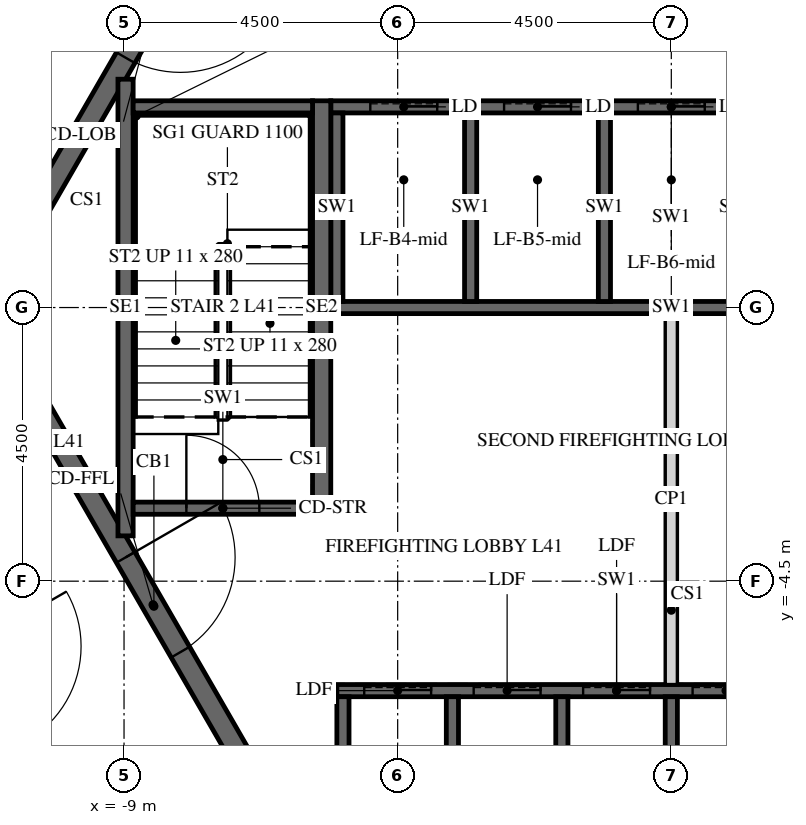
"""IFC4 building model, lengths in metres.
Left out: names, types, materials, properties, quantities, classifications, styles, units other than length and angle.
Written with IfcOpenShell. Run it as: python <this file> out.ifc"""

import sys

from ifc_helpers import new_model, si_unit, direction, frame, frame_2d, origin, place, context, subcontext, project, spatial, polyline, rectangle, outline, extrude, element, fill, save


model = new_model("IFC4")
c1 = context("Model", 3, precision=1e-05, world=origin(), true_north=direction((0.0, 1.0)))
c2 = subcontext(c1, "Body", "Model", "MODEL_VIEW")
j1 = project(units=[si_unit("LENGTHUNIT", "METRE"), si_unit("PLANEANGLEUNIT", "RADIAN")], contexts=[c1])
p1 = place(None, origin())
s1 = spatial("IfcSite", under=j1, at=p1, CompositionType="ELEMENT")
p2 = place(p1, origin())
s2 = spatial("IfcBuilding", under=s1, at=p2, CompositionType="ELEMENT")
p3 = place(p2, frame((0.0, 0.0, 176.1)))
s3 = spatial("IfcBuildingStorey", under=s2, at=p3, CompositionType="ELEMENT", Elevation=176.1)
p4 = place(p3, frame((-7.361, 12.75, -0.15), z_axis=(0.0, 0.0, 1.0), x_axis=(-0.50000571537, -0.866022103989, 0.0)))
e1 = element("IfcWall", 1, at=p4, inside=s3, PredefinedType="SHEAR", context=c2, shape_type="SweptSolid", body=[
    extrude(outline(polyline([(-0.144, -0.25), (14.867, -0.25), (14.578, 0.25), (0.144, 0.25), (-0.144, -0.25)])), origin(), (0.0, 0.0, 1.0), 3.9),
])
p5 = place(p4, frame((6.49, 0.0, 0.15)))
e2 = element("IfcOpeningElement", 2, at=p5, cuts=e1, PredefinedType="OPENING", context=c2, shape_type="SweptSolid", body=[
    extrude(rectangle(XDim=1.8, YDim=2.4, at=frame_2d((0.9, 1.2))), frame((0.0, 0.26, 0.0), z_axis=(0.0, -1.0, 0.0), x_axis=(1.0, 0.0, 0.0)), (0.0, 0.0, 1.0), 0.52),
])
p6 = place(p3, frame((-14.722, 0.0, -0.15), z_axis=(0.0, 0.0, 1.0), x_axis=(0.50000571537, -0.866022103989, 0.0)))
e3 = element("IfcWall", 3, at=p6, inside=s3, PredefinedType="SHEAR", context=c2, shape_type="SweptSolid", body=[
    extrude(outline(polyline([(-0.144, -0.25), (14.867, -0.25), (14.578, 0.25), (0.144, 0.25), (-0.144, -0.25)])), origin(), (0.0, 0.0, 1.0), 3.9),
])
p7 = place(p6, frame((6.432, 0.0, 0.15)))
e4 = element("IfcOpeningElement", 4, at=p7, cuts=e3, PredefinedType="OPENING", context=c2, shape_type="SweptSolid", body=[
    extrude(rectangle(XDim=1.8, YDim=2.4, at=frame_2d((0.9, 1.2))), frame((0.0, 0.26, 0.0), z_axis=(0.0, -1.0, 0.0), x_axis=(1.0, 0.0, 0.0)), (0.0, 0.0, 1.0), 0.52),
])
p8 = place(p3, frame((-5.673, 9.825, -0.15), z_axis=(0.0, 0.0, 1.0), x_axis=(-0.499995046907, -0.866028263435, 0.0)))
e5 = element("IfcWall", 5, at=p8, inside=s3, PredefinedType="SHEAR", context=c2, shape_type="SweptSolid", body=[
    extrude(outline(polyline([(-0.101, -0.175), (11.446, -0.175), (11.244, 0.175), (0.101, 0.175), (-0.101, -0.175)])), origin(), (0.0, 0.0, 1.0), 3.9),
])
p9 = place(p8, frame((4.801, 0.0, 0.15)))
e6 = element("IfcOpeningElement", 6, at=p9, cuts=e5, PredefinedType="OPENING", context=c2, shape_type="SweptSolid", body=[
    extrude(rectangle(XDim=1.8, YDim=2.4, at=frame_2d((0.9, 1.2))), frame((0.0, 0.185, 0.0), z_axis=(0.0, -1.0, 0.0), x_axis=(1.0, 0.0, 0.0)), (0.0, 0.0, 1.0), 0.37),
])
p10 = place(p3, frame((-11.345, 0.0, -0.15), z_axis=(0.0, 0.0, 1.0), x_axis=(0.499995046907, -0.866028263435, 0.0)))
e7 = element("IfcWall", 7, at=p10, inside=s3, PredefinedType="SHEAR", context=c2, shape_type="SweptSolid", body=[
    extrude(outline(polyline([(-0.101, -0.175), (11.446, -0.175), (11.244, 0.175), (0.101, 0.175), (-0.101, -0.175)])), origin(), (0.0, 0.0, 1.0), 3.9),
])
p11 = place(p10, frame((4.744, 0.0, 0.15)))
e8 = element("IfcOpeningElement", 8, at=p11, cuts=e7, PredefinedType="OPENING", context=c2, shape_type="SweptSolid", body=[
    extrude(rectangle(XDim=1.8, YDim=2.4, at=frame_2d((0.9, 1.2))), frame((0.0, 0.185, 0.0), z_axis=(0.0, -1.0, 0.0), x_axis=(1.0, 0.0, 0.0)), (0.0, 0.0, 1.0), 0.37),
])
p12 = place(p3, frame((-5.6, 3.3, -0.25), z_axis=(0.0, 0.0, 1.0), x_axis=(1.0, 0.0, 0.0)))
e9 = element("IfcWall", 9, at=p12, inside=s3, PredefinedType="SHEAR", context=c2, shape_type="SweptSolid", body=[
    extrude(rectangle(XDim=11.2, YDim=0.2, at=frame_2d((5.6, 0.0))), origin(), (0.0, 0.0, 1.0), 3.9),
])
p13 = place(p12, frame((0.65, 0.0, 0.25)))
e10 = element("IfcOpeningElement", 10, at=p13, cuts=e9, PredefinedType="OPENING", context=c2, shape_type="SweptSolid", body=[
    extrude(rectangle(XDim=1.1, YDim=2.1, at=frame_2d((0.55, 1.05))), frame((0.0, 0.11, 0.0), z_axis=(0.0, -1.0, 0.0), x_axis=(1.0, 0.0, 0.0)), (0.0, 0.0, 1.0), 0.22),
])
p14 = place(p12, frame((2.85, 0.0, 0.25)))
e11 = element("IfcOpeningElement", 11, at=p14, cuts=e9, PredefinedType="OPENING", context=c2, shape_type="SweptSolid", body=[
    extrude(rectangle(XDim=1.1, YDim=2.1, at=frame_2d((0.55, 1.05))), frame((0.0, 0.11, 0.0), z_axis=(0.0, -1.0, 0.0), x_axis=(1.0, 0.0, 0.0)), (0.0, 0.0, 1.0), 0.22),
])
p15 = place(p12, frame((5.05, 0.0, 0.25)))
e12 = element("IfcOpeningElement", 12, at=p15, cuts=e9, PredefinedType="OPENING", context=c2, shape_type="SweptSolid", body=[
    extrude(rectangle(XDim=1.1, YDim=2.1, at=frame_2d((0.55, 1.05))), frame((0.0, 0.11, 0.0), z_axis=(0.0, -1.0, 0.0), x_axis=(1.0, 0.0, 0.0)), (0.0, 0.0, 1.0), 0.22),
])
p16 = place(p12, frame((7.25, 0.0, 0.25)))
e13 = element("IfcOpeningElement", 13, at=p16, cuts=e9, PredefinedType="OPENING", context=c2, shape_type="SweptSolid", body=[
    extrude(rectangle(XDim=1.1, YDim=2.1, at=frame_2d((0.55, 1.05))), frame((0.0, 0.11, 0.0), z_axis=(0.0, -1.0, 0.0), x_axis=(1.0, 0.0, 0.0)), (0.0, 0.0, 1.0), 0.22),
])
p17 = place(p12, frame((9.45, 0.0, 0.25)))
e14 = element("IfcOpeningElement", 14, at=p17, cuts=e9, PredefinedType="OPENING", context=c2, shape_type="SweptSolid", body=[
    extrude(rectangle(XDim=1.1, YDim=2.1, at=frame_2d((0.55, 1.05))), frame((0.0, 0.11, 0.0), z_axis=(0.0, -1.0, 0.0), x_axis=(1.0, 0.0, 0.0)), (0.0, 0.0, 1.0), 0.22),
])
p18 = place(p3, frame((-5.6, 0.0, -0.25), z_axis=(0.0, 0.0, 1.0), x_axis=(1.0, 0.0, 0.0)))
e15 = element("IfcWall", 15, at=p18, inside=s3, PredefinedType="SHEAR", context=c2, shape_type="SweptSolid", body=[
    extrude(rectangle(XDim=11.2, YDim=0.2, at=frame_2d((5.6, 0.0))), origin(), (0.0, 0.0, 1.0), 3.9),
])
for number, where, z_axis, x_axis in (
    (16, (-5.5, 0.1, -0.25), (0.0, 0.0, 1.0), (0.0, 1.0, 0.0)),
    (17, (-3.3, 0.1, -0.25), (0.0, 0.0, 1.0), (0.0, 1.0, 0.0)),
    (18, (-1.1, 0.1, -0.25), (0.0, 0.0, 1.0), (0.0, 1.0, 0.0)),
):
    element("IfcWall", number, at=place(p3, frame(where, z_axis=z_axis, x_axis=x_axis)), inside=s3, PredefinedType="SHEAR", context=c2, shape_type="SweptSolid", body=[
        extrude(rectangle(XDim=3.1, YDim=0.2, at=frame_2d((1.55, 0.0))), origin(), (0.0, 0.0, 1.0), 3.9),
    ])
p19 = place(p3, frame((-5.5, -6.3, -0.25), z_axis=(0.0, 0.0, 1.0), x_axis=(1.0, 0.0, 0.0)))
e19 = element("IfcWall", 19, at=p19, inside=s3, PredefinedType="SHEAR", context=c2, shape_type="SweptSolid", body=[
    extrude(rectangle(XDim=9.2, YDim=0.2, at=frame_2d((4.6, 0.0))), origin(), (0.0, 0.0, 1.0), 3.9),
])
p20 = place(p19, frame((0.45, 0.0, 0.25)))
e20 = element("IfcOpeningElement", 20, at=p20, cuts=e19, PredefinedType="OPENING", context=c2, shape_type="SweptSolid", body=[
    extrude(rectangle(XDim=1.1, YDim=2.1, at=frame_2d((0.55, 1.05))), frame((0.0, 0.11, 0.0), z_axis=(0.0, -1.0, 0.0), x_axis=(1.0, 0.0, 0.0)), (0.0, 0.0, 1.0), 0.22),
])
p21 = place(p19, frame((2.25, 0.0, 0.25)))
e21 = element("IfcOpeningElement", 21, at=p21, cuts=e19, PredefinedType="OPENING", context=c2, shape_type="SweptSolid", body=[
    extrude(rectangle(XDim=1.1, YDim=2.1, at=frame_2d((0.55, 1.05))), frame((0.0, 0.11, 0.0), z_axis=(0.0, -1.0, 0.0), x_axis=(1.0, 0.0, 0.0)), (0.0, 0.0, 1.0), 0.22),
])
p22 = place(p19, frame((4.05, 0.0, 0.25)))
e22 = element("IfcOpeningElement", 22, at=p22, cuts=e19, PredefinedType="OPENING", context=c2, shape_type="SweptSolid", body=[
    extrude(rectangle(XDim=1.1, YDim=2.1, at=frame_2d((0.55, 1.05))), frame((0.0, 0.11, 0.0), z_axis=(0.0, -1.0, 0.0), x_axis=(1.0, 0.0, 0.0)), (0.0, 0.0, 1.0), 0.22),
])
p23 = place(p19, frame((5.85, 0.0, 0.25)))
e23 = element("IfcOpeningElement", 23, at=p23, cuts=e19, PredefinedType="OPENING", context=c2, shape_type="SweptSolid", body=[
    extrude(rectangle(XDim=1.1, YDim=2.1, at=frame_2d((0.55, 1.05))), frame((0.0, 0.11, 0.0), z_axis=(0.0, -1.0, 0.0), x_axis=(1.0, 0.0, 0.0)), (0.0, 0.0, 1.0), 0.22),
])
p24 = place(p19, frame((7.65, 0.0, 0.25)))
e24 = element("IfcOpeningElement", 24, at=p24, cuts=e19, PredefinedType="OPENING", context=c2, shape_type="SweptSolid", body=[
    extrude(rectangle(XDim=1.1, YDim=2.1, at=frame_2d((0.55, 1.05))), frame((0.0, 0.11, 0.0), z_axis=(0.0, -1.0, 0.0), x_axis=(1.0, 0.0, 0.0)), (0.0, 0.0, 1.0), 0.22),
])
for number, where, z_axis, x_axis in (
    (25, (-5.4, -9.3, -0.25), (0.0, 0.0, 1.0), (0.0, 1.0, 0.0)),
    (26, (-3.6, -9.3, -0.25), (0.0, 0.0, 1.0), (0.0, 1.0, 0.0)),
    (27, (-1.8, -9.3, -0.25), (0.0, 0.0, 1.0), (0.0, 1.0, 0.0)),
    (28, (0.0, -9.3, -0.25), (0.0, 0.0, 1.0), (0.0, 1.0, 0.0)),
):
    element("IfcWall", number, at=place(p3, frame(where, z_axis=z_axis, x_axis=x_axis)), inside=s3, PredefinedType="SHEAR", context=c2, shape_type="SweptSolid", body=[
        extrude(rectangle(XDim=2.9, YDim=0.2, at=frame_2d((1.45, 0.0))), origin(), (0.0, 0.0, 1.0), 3.9),
    ])
p25 = place(p3, frame((0.0, -6.2, 0.0), z_axis=(0.0, 0.0, 1.0), x_axis=(0.0, 1.0, 0.0)))
e29 = element("IfcWall", 29, at=p25, inside=s3, PredefinedType="PARTITIONING", context=c2, shape_type="SweptSolid", body=[
    extrude(rectangle(XDim=6.1, YDim=0.2, at=frame_2d((3.05, 0.0))), origin(), (0.0, 0.0, 1.0), 3.65),
])
p26 = place(p3, frame((-5.75, -3.4, -0.25), z_axis=(0.0, 0.0, 1.0), x_axis=(0.0, 1.0, 0.0)))
e30 = element("IfcWall", 30, at=p26, inside=s3, PredefinedType="SHEAR", context=c2, shape_type="SweptSolid", body=[
    extrude(rectangle(XDim=6.8, YDim=0.3, at=frame_2d((3.4, 0.0))), origin(), (0.0, 0.0, 1.0), 3.9),
])
p27 = place(p3, frame((-8.975, -3.755, -0.25), z_axis=(0.0, 0.0, 1.0), x_axis=(0.0, 1.0, 0.0)))
e31 = element("IfcWall", 31, at=p27, inside=s3, PredefinedType="SHEAR", context=c2, shape_type="SweptSolid", body=[
    extrude(rectangle(XDim=7.51, YDim=0.25, at=frame_2d((3.755, 0.0))), origin(), (0.0, 0.0, 1.0), 3.9),
])
p28 = place(p3, frame((-8.85, 3.3, -0.25), z_axis=(0.0, 0.0, 1.0), x_axis=(1.0, 0.0, 0.0)))
e32 = element("IfcWall", 32, at=p28, inside=s3, PredefinedType="SHEAR", context=c2, shape_type="SweptSolid", body=[
    extrude(rectangle(XDim=2.95, YDim=0.2, at=frame_2d((1.475, 0.0))), origin(), (0.0, 0.0, 1.0), 3.9),
])
p29 = place(p3, frame((-8.85, -3.3, -0.25), z_axis=(0.0, 0.0, 1.0), x_axis=(1.0, 0.0, 0.0)))
e33 = element("IfcWall", 33, at=p29, inside=s3, PredefinedType="SHEAR", context=c2, shape_type="SweptSolid", body=[
    extrude(rectangle(XDim=2.95, YDim=0.2, at=frame_2d((1.475, 0.0))), origin(), (0.0, 0.0, 1.0), 3.9),
])
p30 = place(p29, frame((0.875, 0.0, 0.25)))
e34 = element("IfcOpeningElement", 34, at=p30, cuts=e33, PredefinedType="OPENING", context=c2, shape_type="SweptSolid", body=[
    extrude(rectangle(XDim=1.2, YDim=2.4, at=frame_2d((0.6, 1.2))), frame((0.0, 0.11, 0.0), z_axis=(0.0, -1.0, 0.0), x_axis=(1.0, 0.0, 0.0)), (0.0, 0.0, 1.0), 0.22),
])
p31 = place(p3, frame((-8.588, 14.725, 0.0), z_axis=(0.0, 0.0, 1.0), x_axis=(-0.499996322767, -0.866027526826, 0.0)))
e35 = element("IfcWall", 35, at=p31, inside=s3, PredefinedType="PARTITIONING", context=c2, shape_type="SweptSolid", body=[
    extrude(rectangle(XDim=14.636, YDim=0.15, at=frame_2d((7.318, 0.0))), origin(), (0.0, 0.0, 1.0), 2.988),
])
p32 = place(p31, frame((0.936, 0.0, 0.0)))
e36 = element("IfcOpeningElement", 36, at=p32, cuts=e35, PredefinedType="OPENING", context=c2, shape_type="SweptSolid", body=[
    extrude(rectangle(XDim=1.0, YDim=2.1, at=frame_2d((0.5, 1.05))), frame((0.0, 0.085, 0.0), z_axis=(0.0, -1.0, 0.0), x_axis=(1.0, 0.0, 0.0)), (0.0, 0.0, 1.0), 0.17),
])
p33 = place(p31, frame((4.771, 0.0, 0.0)))
e37 = element("IfcOpeningElement", 37, at=p33, cuts=e35, PredefinedType="OPENING", context=c2, shape_type="SweptSolid", body=[
    extrude(rectangle(XDim=1.0, YDim=2.1, at=frame_2d((0.5, 1.05))), frame((0.0, 0.085, 0.0), z_axis=(0.0, -1.0, 0.0), x_axis=(1.0, 0.0, 0.0)), (0.0, 0.0, 1.0), 0.17),
])
p34 = place(p31, frame((13.103, 0.0, 0.0)))
e38 = element("IfcOpeningElement", 38, at=p34, cuts=e35, PredefinedType="OPENING", context=c2, shape_type="SweptSolid", body=[
    extrude(rectangle(XDim=1.0, YDim=2.1, at=frame_2d((0.5, 1.05))), frame((0.0, 0.085, 0.0), z_axis=(0.0, -1.0, 0.0), x_axis=(1.0, 0.0, 0.0)), (0.0, 0.0, 1.0), 0.17),
])
p35 = place(p3, frame((-14.921, -3.757, 0.0), z_axis=(0.0, 0.0, 1.0), x_axis=(0.500001980452, -0.866024260367, 0.0)))
e39 = element("IfcWall", 39, at=p35, inside=s3, PredefinedType="PARTITIONING", context=c2, shape_type="SweptSolid", body=[
    extrude(rectangle(XDim=12.752, YDim=0.15, at=frame_2d((6.376, 0.0))), origin(), (0.0, 0.0, 1.0), 2.988),
])
p36 = place(p35, frame((6.225, 0.0, 0.0)))
e40 = element("IfcOpeningElement", 40, at=p36, cuts=e39, PredefinedType="OPENING", context=c2, shape_type="SweptSolid", body=[
    extrude(rectangle(XDim=1.0, YDim=2.1, at=frame_2d((0.5, 1.05))), frame((0.0, 0.085, 0.0), z_axis=(0.0, -1.0, 0.0), x_axis=(1.0, 0.0, 0.0)), (0.0, 0.0, 1.0), 0.17),
])
p37 = place(p35, frame((11.602, 0.0, 0.0)))
e41 = element("IfcOpeningElement", 41, at=p37, cuts=e39, PredefinedType="OPENING", context=c2, shape_type="SweptSolid", body=[
    extrude(rectangle(XDim=1.0, YDim=2.1, at=frame_2d((0.5, 1.05))), frame((0.0, 0.085, 0.0), z_axis=(0.0, -1.0, 0.0), x_axis=(1.0, 0.0, 0.0)), (0.0, 0.0, 1.0), 0.17),
])
p38 = place(p9, origin())
e42 = element("IfcDoor", 42, at=p38, inside=s3, OperationType="DOUBLE_DOOR_SINGLE_SWING", PredefinedType="DOOR", context=c2, shape_type="SweptSolid", body=[
    extrude(rectangle(XDim=1.8, YDim=2.4, at=frame_2d((0.9, 1.2))), frame((0.0, 0.025, 0.0), z_axis=(0.0, -1.0, 0.0), x_axis=(1.0, 0.0, 0.0)), (0.0, 0.0, 1.0), 0.05),
])
fill(e6, e42)
p39 = place(p11, origin())
e43 = element("IfcDoor", 43, at=p39, inside=s3, OperationType="DOUBLE_DOOR_SINGLE_SWING", PredefinedType="DOOR", context=c2, shape_type="SweptSolid", body=[
    extrude(rectangle(XDim=1.8, YDim=2.4, at=frame_2d((0.9, 1.2))), frame((0.0, 0.025, 0.0), z_axis=(0.0, -1.0, 0.0), x_axis=(1.0, 0.0, 0.0)), (0.0, 0.0, 1.0), 0.05),
])
fill(e8, e43)
p40 = place(p30, origin())
e44 = element("IfcDoor", 44, at=p40, inside=s3, OperationType="SINGLE_SWING_LEFT", PredefinedType="DOOR", context=c2, shape_type="SweptSolid", body=[
    extrude(rectangle(XDim=1.2, YDim=2.4, at=frame_2d((0.6, 1.2))), frame((0.0, 0.025, 0.0), z_axis=(0.0, -1.0, 0.0), x_axis=(1.0, 0.0, 0.0)), (0.0, 0.0, 1.0), 0.05),
])
fill(e34, e44)
p41 = place(p13, origin())
e45 = element("IfcDoor", 45, at=p41, inside=s3, OperationType="SLIDING_TO_LEFT", PredefinedType="DOOR", context=c2, shape_type="SweptSolid", body=[
    extrude(rectangle(XDim=1.1, YDim=2.1, at=frame_2d((0.55, 1.05))), frame((0.0, 0.025, 0.0), z_axis=(0.0, -1.0, 0.0), x_axis=(1.0, 0.0, 0.0)), (0.0, 0.0, 1.0), 0.05),
])
fill(e10, e45)
p42 = place(p14, origin())
e46 = element("IfcDoor", 46, at=p42, inside=s3, OperationType="SLIDING_TO_LEFT", PredefinedType="DOOR", context=c2, shape_type="SweptSolid", body=[
    extrude(rectangle(XDim=1.1, YDim=2.1, at=frame_2d((0.55, 1.05))), frame((0.0, 0.025, 0.0), z_axis=(0.0, -1.0, 0.0), x_axis=(1.0, 0.0, 0.0)), (0.0, 0.0, 1.0), 0.05),
])
fill(e11, e46)
p43 = place(p15, origin())
e47 = element("IfcDoor", 47, at=p43, inside=s3, OperationType="SLIDING_TO_LEFT", PredefinedType="DOOR", context=c2, shape_type="SweptSolid", body=[
    extrude(rectangle(XDim=1.1, YDim=2.1, at=frame_2d((0.55, 1.05))), frame((0.0, 0.025, 0.0), z_axis=(0.0, -1.0, 0.0), x_axis=(1.0, 0.0, 0.0)), (0.0, 0.0, 1.0), 0.05),
])
fill(e12, e47)
p44 = place(p20, origin())
e48 = element("IfcDoor", 48, at=p44, inside=s3, OperationType="SLIDING_TO_LEFT", PredefinedType="DOOR", context=c2, shape_type="SweptSolid", body=[
    extrude(rectangle(XDim=1.1, YDim=2.1, at=frame_2d((0.55, 1.05))), frame((0.0, 0.025, 0.0), z_axis=(0.0, -1.0, 0.0), x_axis=(1.0, 0.0, 0.0)), (0.0, 0.0, 1.0), 0.05),
])
fill(e20, e48)
p45 = place(p21, origin())
e49 = element("IfcDoor", 49, at=p45, inside=s3, OperationType="SLIDING_TO_LEFT", PredefinedType="DOOR", context=c2, shape_type="SweptSolid", body=[
    extrude(rectangle(XDim=1.1, YDim=2.1, at=frame_2d((0.55, 1.05))), frame((0.0, 0.025, 0.0), z_axis=(0.0, -1.0, 0.0), x_axis=(1.0, 0.0, 0.0)), (0.0, 0.0, 1.0), 0.05),
])
fill(e21, e49)
p46 = place(p22, origin())
e50 = element("IfcDoor", 50, at=p46, inside=s3, OperationType="SLIDING_TO_LEFT", PredefinedType="DOOR", context=c2, shape_type="SweptSolid", body=[
    extrude(rectangle(XDim=1.1, YDim=2.1, at=frame_2d((0.55, 1.05))), frame((0.0, 0.025, 0.0), z_axis=(0.0, -1.0, 0.0), x_axis=(1.0, 0.0, 0.0)), (0.0, 0.0, 1.0), 0.05),
])
fill(e22, e50)
p47 = place(p23, origin())
e51 = element("IfcDoor", 51, at=p47, inside=s3, OperationType="SLIDING_TO_LEFT", PredefinedType="DOOR", context=c2, shape_type="SweptSolid", body=[
    extrude(rectangle(XDim=1.1, YDim=2.1, at=frame_2d((0.55, 1.05))), frame((0.0, 0.025, 0.0), z_axis=(0.0, -1.0, 0.0), x_axis=(1.0, 0.0, 0.0)), (0.0, 0.0, 1.0), 0.05),
])
fill(e23, e51)
save(model, sys.argv[1])
